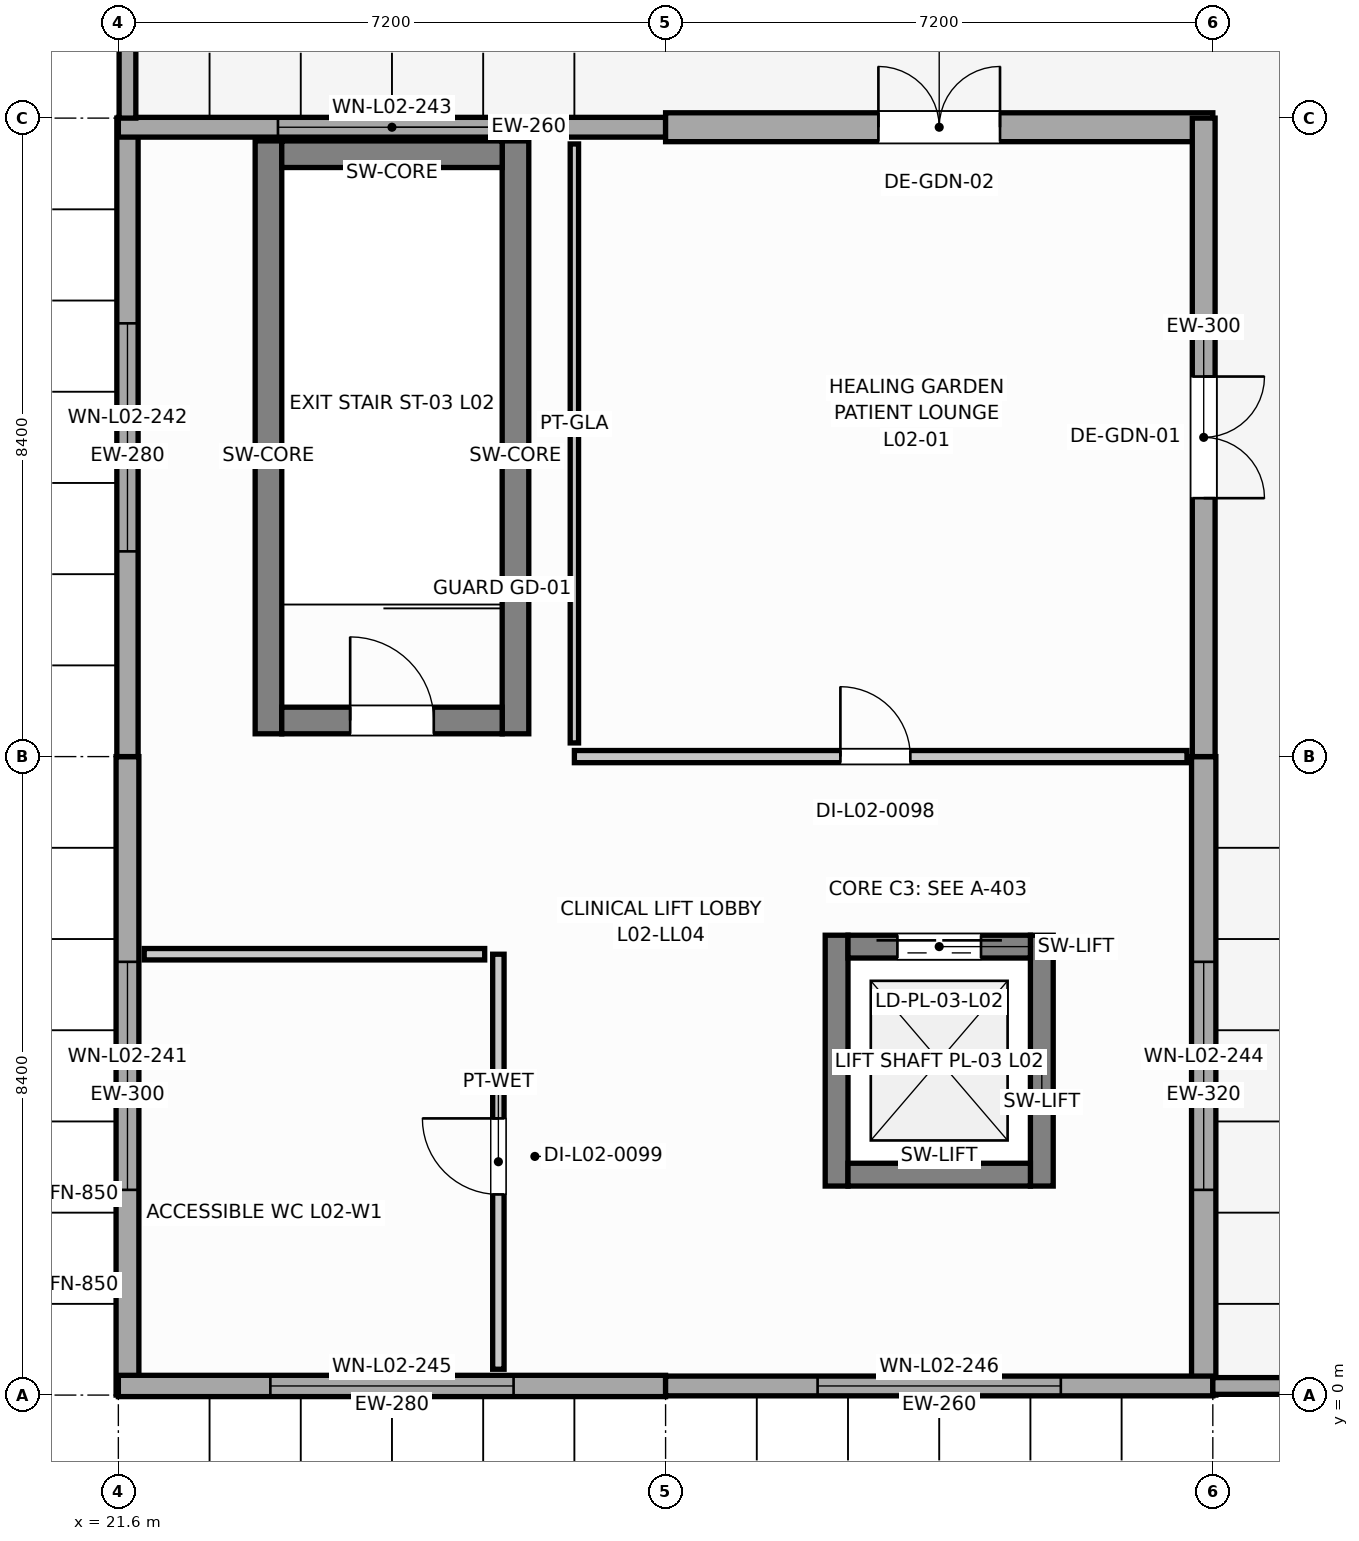
"""IFC4 building model, lengths in metres.
Left out: names, types, materials, properties, quantities, classifications, styles, units other than length and angle.
Written with IfcOpenShell. Run it as: python <this file> out.ifc"""

import sys

from ifc_helpers import new_model, si_unit, direction, frame, frame_2d, origin, place, context, subcontext, project, spatial, rectangle, extrude, element, fill, save


model = new_model("IFC4")
c1 = context("Model", 3, precision=1e-05, world=origin(), true_north=direction((0.0, 1.0)))
c2 = subcontext(c1, "Body", "Model", "MODEL_VIEW")
j1 = project(units=[si_unit("LENGTHUNIT", "METRE"), si_unit("PLANEANGLEUNIT", "RADIAN")], contexts=[c1])
p1 = place(None, origin())
s1 = spatial("IfcSite", under=j1, at=p1, CompositionType="ELEMENT")
p2 = place(p1, origin())
s2 = spatial("IfcBuilding", under=s1, at=p2, CompositionType="ELEMENT")
p3 = place(p2, frame((0.0, 0.0, 9.0)))
s3 = spatial("IfcBuildingStorey", under=s2, at=p3, CompositionType="ELEMENT", Elevation=9.0)
for number, where, z_axis, x_axis in (
    (1, (23.575, 8.7, 0.0), (0.0, 0.0, 1.0), (0.0, 1.0, 0.0)),
    (2, (26.825, 8.7, 0.0), (0.0, 0.0, 1.0), (0.0, 1.0, 0.0)),
):
    element("IfcWall", number, at=place(p3, frame(where, z_axis=z_axis, x_axis=x_axis)), inside=s3, PredefinedType="SHEAR", context=c2, shape_type="SweptSolid", body=[
        extrude(rectangle(XDim=7.8, YDim=0.35, at=frame_2d((3.9, 0.0))), origin(), (0.0, 0.0, 1.0), 3.965),
    ])
p4 = place(p3, frame((23.75, 16.325, 0.0), z_axis=(0.0, 0.0, 1.0), x_axis=(1.0, 0.0, 0.0)))
e3 = element("IfcWall", 3, at=p4, inside=s3, PredefinedType="SHEAR", context=c2, shape_type="SweptSolid", body=[
    extrude(rectangle(XDim=2.9, YDim=0.35, at=frame_2d((1.45, 0.0))), origin(), (0.0, 0.0, 1.0), 3.965),
])
p5 = place(p3, frame((23.75, 8.875, 0.0), z_axis=(0.0, 0.0, 1.0), x_axis=(1.0, 0.0, 0.0)))
e4 = element("IfcWall", 4, at=p5, inside=s3, PredefinedType="SHEAR", context=c2, shape_type="SweptSolid", body=[
    extrude(rectangle(XDim=2.9, YDim=0.35, at=frame_2d((1.45, 0.0))), origin(), (0.0, 0.0, 1.0), 3.965),
])
p6 = place(p5, frame((0.9, 0.0, 0.0)))
e5 = element("IfcOpeningElement", 5, at=p6, cuts=e4, PredefinedType="OPENING", context=c2, shape_type="SweptSolid", body=[
    extrude(rectangle(XDim=1.1, YDim=2.15, at=frame_2d((0.55, 1.075))), frame((0.0, 0.185, 0.0), z_axis=(0.0, -1.0, 0.0), x_axis=(1.0, 0.0, 0.0)), (0.0, 0.0, 1.0), 0.37),
])
for number, where, z_axis, x_axis in (
    (6, (31.05, 2.75, 0.0), (0.0, 0.0, 1.0), (0.0, 1.0, 0.0)),
    (7, (33.75, 2.75, 0.0), (0.0, 0.0, 1.0), (0.0, 1.0, 0.0)),
):
    element("IfcWall", number, at=place(p3, frame(where, z_axis=z_axis, x_axis=x_axis)), inside=s3, PredefinedType="SHEAR", context=c2, shape_type="SweptSolid", body=[
        extrude(rectangle(XDim=3.3, YDim=0.3, at=frame_2d((1.65, 0.0))), origin(), (0.0, 0.0, 1.0), 3.965),
    ])
p7 = place(p3, frame((31.2, 5.9, 0.0), z_axis=(0.0, 0.0, 1.0), x_axis=(1.0, 0.0, 0.0)))
e8 = element("IfcWall", 8, at=p7, inside=s3, PredefinedType="SHEAR", context=c2, shape_type="SweptSolid", body=[
    extrude(rectangle(XDim=2.4, YDim=0.3, at=frame_2d((1.2, 0.0))), origin(), (0.0, 0.0, 1.0), 3.965),
])
p8 = place(p7, frame((0.65, 0.0, 0.0)))
e9 = element("IfcOpeningElement", 9, at=p8, cuts=e8, PredefinedType="OPENING", context=c2, shape_type="SweptSolid", body=[
    extrude(rectangle(XDim=1.1, YDim=2.15, at=frame_2d((0.55, 1.075))), frame((0.0, 0.16, 0.0), z_axis=(0.0, -1.0, 0.0), x_axis=(1.0, 0.0, 0.0)), (0.0, 0.0, 1.0), 0.32),
])
p9 = place(p3, frame((31.2, 2.9, 0.0), z_axis=(0.0, 0.0, 1.0), x_axis=(1.0, 0.0, 0.0)))
e10 = element("IfcWall", 10, at=p9, inside=s3, PredefinedType="SHEAR", context=c2, shape_type="SweptSolid", body=[
    extrude(rectangle(XDim=2.4, YDim=0.3, at=frame_2d((1.2, 0.0))), origin(), (0.0, 0.0, 1.0), 3.965),
])
p10 = place(p3, frame((21.72, 0.0, 0.0), z_axis=(0.0, 0.0, 1.0), x_axis=(0.0, 1.0, 0.0)))
e11 = element("IfcWall", 11, at=p10, inside=s3, PredefinedType="SOLIDWALL", context=c2, shape_type="SweptSolid", body=[
    extrude(rectangle(XDim=8.4, YDim=0.3, at=frame_2d((4.2, 0.0))), origin(), (0.0, 0.0, 1.0), 3.94),
])
p11 = place(p10, frame((2.7, 0.0, 0.95)))
e12 = element("IfcOpeningElement", 12, at=p11, cuts=e11, PredefinedType="OPENING", context=c2, shape_type="SweptSolid", body=[
    extrude(rectangle(XDim=3.0, YDim=1.15, at=frame_2d((1.5, 0.575))), frame((0.0, 0.16, 0.0), z_axis=(0.0, -1.0, 0.0), x_axis=(1.0, 0.0, 0.0)), (0.0, 0.0, 1.0), 0.32),
])
p12 = place(p3, frame((21.72, 8.4, 0.0), z_axis=(0.0, 0.0, 1.0), x_axis=(0.0, 1.0, 0.0)))
e13 = element("IfcWall", 13, at=p12, inside=s3, PredefinedType="SOLIDWALL", context=c2, shape_type="SweptSolid", body=[
    extrude(rectangle(XDim=8.4, YDim=0.28, at=frame_2d((4.2, 0.0))), origin(), (0.0, 0.0, 1.0), 3.94),
])
p13 = place(p12, frame((2.7, 0.0, 0.95)))
e14 = element("IfcOpeningElement", 14, at=p13, cuts=e13, PredefinedType="OPENING", context=c2, shape_type="SweptSolid", body=[
    extrude(rectangle(XDim=3.0, YDim=1.35, at=frame_2d((1.5, 0.675))), frame((0.0, 0.15, 0.0), z_axis=(0.0, -1.0, 0.0), x_axis=(1.0, 0.0, 0.0)), (0.0, 0.0, 1.0), 0.3),
])
p14 = place(p3, frame((21.6, 16.68, 0.0), z_axis=(0.0, 0.0, 1.0), x_axis=(1.0, 0.0, 0.0)))
e15 = element("IfcWall", 15, at=p14, inside=s3, PredefinedType="SOLIDWALL", context=c2, shape_type="SweptSolid", body=[
    extrude(rectangle(XDim=7.2, YDim=0.26, at=frame_2d((3.6, 0.0))), origin(), (0.0, 0.0, 1.0), 3.94),
])
p15 = place(p14, frame((2.1, 0.0, 0.95)))
e16 = element("IfcOpeningElement", 16, at=p15, cuts=e15, PredefinedType="OPENING", context=c2, shape_type="SweptSolid", body=[
    extrude(rectangle(XDim=3.0, YDim=1.55, at=frame_2d((1.5, 0.775))), frame((0.0, 0.14, 0.0), z_axis=(0.0, -1.0, 0.0), x_axis=(1.0, 0.0, 0.0)), (0.0, 0.0, 1.0), 0.28),
])
p16 = place(p3, frame((28.8, 16.68, 0.0), z_axis=(0.0, 0.0, 1.0), x_axis=(1.0, 0.0, 0.0)))
e17 = element("IfcWall", 17, at=p16, inside=s3, PredefinedType="SOLIDWALL", context=c2, shape_type="SweptSolid", body=[
    extrude(rectangle(XDim=7.2, YDim=0.38, at=frame_2d((3.6, 0.0))), origin(), (0.0, 0.0, 1.0), 3.94),
])
p17 = place(p16, frame((2.8, 0.0, 0.0)))
e18 = element("IfcOpeningElement", 18, at=p17, cuts=e17, PredefinedType="OPENING", context=c2, shape_type="SweptSolid", body=[
    extrude(rectangle(XDim=1.6, YDim=2.2, at=frame_2d((0.8, 1.1))), frame((0.0, 0.2, 0.0), z_axis=(0.0, -1.0, 0.0), x_axis=(1.0, 0.0, 0.0)), (0.0, 0.0, 1.0), 0.4),
])
p18 = place(p3, frame((35.88, 0.0, 0.0), z_axis=(0.0, 0.0, 1.0), x_axis=(0.0, 1.0, 0.0)))
e19 = element("IfcWall", 19, at=p18, inside=s3, PredefinedType="SOLIDWALL", context=c2, shape_type="SweptSolid", body=[
    extrude(rectangle(XDim=8.4, YDim=0.32, at=frame_2d((4.2, 0.0))), origin(), (0.0, 0.0, 1.0), 3.94),
])
p19 = place(p18, frame((2.7, 0.0, 0.95)))
e20 = element("IfcOpeningElement", 20, at=p19, cuts=e19, PredefinedType="OPENING", context=c2, shape_type="SweptSolid", body=[
    extrude(rectangle(XDim=3.0, YDim=1.75, at=frame_2d((1.5, 0.875))), frame((0.0, 0.17, 0.0), z_axis=(0.0, -1.0, 0.0), x_axis=(1.0, 0.0, 0.0)), (0.0, 0.0, 1.0), 0.34),
])
p20 = place(p3, frame((35.88, 8.4, 0.0), z_axis=(0.0, 0.0, 1.0), x_axis=(0.0, 1.0, 0.0)))
e21 = element("IfcWall", 21, at=p20, inside=s3, PredefinedType="SOLIDWALL", context=c2, shape_type="SweptSolid", body=[
    extrude(rectangle(XDim=8.4, YDim=0.3, at=frame_2d((4.2, 0.0))), origin(), (0.0, 0.0, 1.0), 3.94),
])
p21 = place(p20, frame((3.4, 0.0, 0.0)))
e22 = element("IfcOpeningElement", 22, at=p21, cuts=e21, PredefinedType="OPENING", context=c2, shape_type="SweptSolid", body=[
    extrude(rectangle(XDim=1.6, YDim=2.2, at=frame_2d((0.8, 1.1))), frame((0.0, 0.16, 0.0), z_axis=(0.0, -1.0, 0.0), x_axis=(1.0, 0.0, 0.0)), (0.0, 0.0, 1.0), 0.32),
])
p22 = place(p3, frame((21.6, 0.12, 0.0), z_axis=(0.0, 0.0, 1.0), x_axis=(1.0, 0.0, 0.0)))
e23 = element("IfcWall", 23, at=p22, inside=s3, PredefinedType="SOLIDWALL", context=c2, shape_type="SweptSolid", body=[
    extrude(rectangle(XDim=7.2, YDim=0.28, at=frame_2d((3.6, 0.0))), origin(), (0.0, 0.0, 1.0), 3.94),
])
p23 = place(p22, frame((2.0, 0.0, 0.95)))
e24 = element("IfcOpeningElement", 24, at=p23, cuts=e23, PredefinedType="OPENING", context=c2, shape_type="SweptSolid", body=[
    extrude(rectangle(XDim=3.2, YDim=1.15, at=frame_2d((1.6, 0.575))), frame((0.0, 0.15, 0.0), z_axis=(0.0, -1.0, 0.0), x_axis=(1.0, 0.0, 0.0)), (0.0, 0.0, 1.0), 0.3),
])
p24 = place(p3, frame((28.8, 0.12, 0.0), z_axis=(0.0, 0.0, 1.0), x_axis=(1.0, 0.0, 0.0)))
e25 = element("IfcWall", 25, at=p24, inside=s3, PredefinedType="SOLIDWALL", context=c2, shape_type="SweptSolid", body=[
    extrude(rectangle(XDim=7.2, YDim=0.26, at=frame_2d((3.6, 0.0))), origin(), (0.0, 0.0, 1.0), 3.94),
])
p25 = place(p24, frame((2.0, 0.0, 0.95)))
e26 = element("IfcOpeningElement", 26, at=p25, cuts=e25, PredefinedType="OPENING", context=c2, shape_type="SweptSolid", body=[
    extrude(rectangle(XDim=3.2, YDim=1.35, at=frame_2d((1.6, 0.675))), frame((0.0, 0.14, 0.0), z_axis=(0.0, -1.0, 0.0), x_axis=(1.0, 0.0, 0.0)), (0.0, 0.0, 1.0), 0.28),
])
p26 = place(p3, frame((36.0, 0.12, 0.0), z_axis=(0.0, 0.0, 1.0), x_axis=(1.0, 0.0, 0.0)))
e27 = element("IfcWall", 27, at=p26, inside=s3, PredefinedType="PARAPET", context=c2, shape_type="SweptSolid", body=[
    extrude(rectangle(XDim=7.08, YDim=0.22, at=frame_2d((3.54, 0.0))), origin(), (0.0, 0.0, 1.0), 1.15),
])
p27 = place(p3, frame((21.72, 33.48, 0.0), z_axis=(0.0, 0.0, 1.0), x_axis=(0.0, -1.0, 0.0)))
e28 = element("IfcWall", 28, at=p27, inside=s3, PredefinedType="PARAPET", context=c2, shape_type="SweptSolid", body=[
    extrude(rectangle(XDim=16.68, YDim=0.22, at=frame_2d((8.34, 0.0))), origin(), (0.0, 0.0, 1.0), 1.15),
])
p28 = place(p3, frame((35.66, 8.4, 0.0), z_axis=(0.0, 0.0, 1.0), x_axis=(-1.0, 0.0, 0.0)))
e29 = element("IfcWall", 29, at=p28, inside=s3, PredefinedType="PARTITIONING", context=c2, shape_type="SweptSolid", body=[
    extrude(rectangle(XDim=8.06, YDim=0.16, at=frame_2d((4.03, 0.0))), origin(), (0.0, 0.0, 1.0), 3.945),
])
p29 = place(p28, frame((3.64, 0.0, 0.0)))
e30 = element("IfcOpeningElement", 30, at=p29, cuts=e29, PredefinedType="OPENING", context=c2, shape_type="SweptSolid", body=[
    extrude(rectangle(XDim=0.92, YDim=2.1, at=frame_2d((0.46, 1.05))), frame((0.0, 0.09, 0.0), z_axis=(0.0, -1.0, 0.0), x_axis=(1.0, 0.0, 0.0)), (0.0, 0.0, 1.0), 0.18),
])
p30 = place(p3, frame((27.6, 8.58, 0.0), z_axis=(0.0, 0.0, 1.0), x_axis=(0.0, 1.0, 0.0)))
e31 = element("IfcWall", 31, at=p30, inside=s3, PredefinedType="MOVABLE", context=c2, shape_type="SweptSolid", body=[
    extrude(rectangle(XDim=7.88, YDim=0.11, at=frame_2d((3.94, 0.0))), origin(), (0.0, 0.0, 1.0), 3.945),
])
p31 = place(p3, frame((26.6, 5.8, 0.0), z_axis=(0.0, 0.0, 1.0), x_axis=(0.0, -1.0, 0.0)))
e32 = element("IfcWall", 32, at=p31, inside=s3, PredefinedType="PLUMBINGWALL", context=c2, shape_type="SweptSolid", body=[
    extrude(rectangle(XDim=5.46, YDim=0.15, at=frame_2d((2.73, 0.0))), origin(), (0.0, 0.0, 1.0), 3.945),
])
p32 = place(p31, frame((2.16, 0.0, 0.0)))
e33 = element("IfcOpeningElement", 33, at=p32, cuts=e32, PredefinedType="OPENING", context=c2, shape_type="SweptSolid", body=[
    extrude(rectangle(XDim=1.0, YDim=2.1, at=frame_2d((0.5, 1.05))), frame((0.0, 0.085, 0.0), z_axis=(0.0, -1.0, 0.0), x_axis=(1.0, 0.0, 0.0)), (0.0, 0.0, 1.0), 0.17),
])
p33 = place(p3, frame((21.94, 5.8, 0.0), z_axis=(0.0, 0.0, 1.0), x_axis=(1.0, 0.0, 0.0)))
e34 = element("IfcWall", 34, at=p33, inside=s3, PredefinedType="PLUMBINGWALL", context=c2, shape_type="SweptSolid", body=[
    extrude(rectangle(XDim=4.48, YDim=0.15, at=frame_2d((2.24, 0.0))), origin(), (0.0, 0.0, 1.0), 3.945),
])
p34 = place(p6, origin())
e35 = element("IfcDoor", 35, at=p34, inside=s3, OperationType="SINGLE_SWING_LEFT", PredefinedType="DOOR", context=c2, shape_type="SweptSolid", body=[
    extrude(rectangle(XDim=1.1, YDim=2.15, at=frame_2d((0.55, 1.075))), frame((0.0, 0.025, 0.0), z_axis=(0.0, -1.0, 0.0), x_axis=(1.0, 0.0, 0.0)), (0.0, 0.0, 1.0), 0.05),
])
fill(e5, e35)
p35 = place(p8, origin())
e36 = element("IfcDoor", 36, at=p35, inside=s3, OperationType="DOUBLE_DOOR_SLIDING", PredefinedType="DOOR", context=c2, shape_type="SweptSolid", body=[
    extrude(rectangle(XDim=1.1, YDim=2.15, at=frame_2d((0.55, 1.075))), frame((0.0, 0.025, 0.0), z_axis=(0.0, -1.0, 0.0), x_axis=(1.0, 0.0, 0.0)), (0.0, 0.0, 1.0), 0.05),
])
fill(e9, e36)
p36 = place(p11, origin())
e37 = element("IfcWindow", 37, at=p36, inside=s3, PartitioningType="SINGLE_PANEL", PredefinedType="WINDOW", context=c2, shape_type="SweptSolid", body=[
    extrude(rectangle(XDim=3.0, YDim=1.15, at=frame_2d((1.5, 0.575))), frame((0.0, 0.03, 0.0), z_axis=(0.0, -1.0, 0.0), x_axis=(1.0, 0.0, 0.0)), (0.0, 0.0, 1.0), 0.06),
])
fill(e12, e37)
p37 = place(p13, origin())
e38 = element("IfcWindow", 38, at=p37, inside=s3, PartitioningType="SINGLE_PANEL", PredefinedType="WINDOW", context=c2, shape_type="SweptSolid", body=[
    extrude(rectangle(XDim=3.0, YDim=1.35, at=frame_2d((1.5, 0.675))), frame((0.0, 0.03, 0.0), z_axis=(0.0, -1.0, 0.0), x_axis=(1.0, 0.0, 0.0)), (0.0, 0.0, 1.0), 0.06),
])
fill(e14, e38)
p38 = place(p15, origin())
e39 = element("IfcWindow", 39, at=p38, inside=s3, PartitioningType="SINGLE_PANEL", PredefinedType="WINDOW", context=c2, shape_type="SweptSolid", body=[
    extrude(rectangle(XDim=3.0, YDim=1.55, at=frame_2d((1.5, 0.775))), frame((0.0, 0.03, 0.0), z_axis=(0.0, -1.0, 0.0), x_axis=(1.0, 0.0, 0.0)), (0.0, 0.0, 1.0), 0.06),
])
fill(e16, e39)
p39 = place(p17, origin())
e40 = element("IfcDoor", 40, at=p39, inside=s3, OperationType="DOUBLE_DOOR_SINGLE_SWING", PredefinedType="DOOR", context=c2, shape_type="SweptSolid", body=[
    extrude(rectangle(XDim=1.6, YDim=2.2, at=frame_2d((0.8, 1.1))), frame((0.0, 0.025, 0.0), z_axis=(0.0, -1.0, 0.0), x_axis=(1.0, 0.0, 0.0)), (0.0, 0.0, 1.0), 0.05),
])
fill(e18, e40)
p40 = place(p19, origin())
e41 = element("IfcWindow", 41, at=p40, inside=s3, PartitioningType="SINGLE_PANEL", PredefinedType="WINDOW", context=c2, shape_type="SweptSolid", body=[
    extrude(rectangle(XDim=3.0, YDim=1.75, at=frame_2d((1.5, 0.875))), frame((0.0, 0.03, 0.0), z_axis=(0.0, -1.0, 0.0), x_axis=(1.0, 0.0, 0.0)), (0.0, 0.0, 1.0), 0.06),
])
fill(e20, e41)
p41 = place(p21, frame((1.6, 0.0, 0.0), z_axis=(0.0, 0.0, 1.0), x_axis=(-1.0, 0.0, 0.0)))
e42 = element("IfcDoor", 42, at=p41, inside=s3, OperationType="DOUBLE_DOOR_SINGLE_SWING", PredefinedType="DOOR", context=c2, shape_type="SweptSolid", body=[
    extrude(rectangle(XDim=1.6, YDim=2.2, at=frame_2d((0.8, 1.1))), frame((0.0, 0.025, 0.0), z_axis=(0.0, -1.0, 0.0), x_axis=(1.0, 0.0, 0.0)), (0.0, 0.0, 1.0), 0.05),
])
fill(e22, e42)
p42 = place(p23, origin())
e43 = element("IfcWindow", 43, at=p42, inside=s3, PartitioningType="SINGLE_PANEL", PredefinedType="WINDOW", context=c2, shape_type="SweptSolid", body=[
    extrude(rectangle(XDim=3.2, YDim=1.15, at=frame_2d((1.6, 0.575))), frame((0.0, 0.03, 0.0), z_axis=(0.0, -1.0, 0.0), x_axis=(1.0, 0.0, 0.0)), (0.0, 0.0, 1.0), 0.06),
])
fill(e24, e43)
p43 = place(p25, origin())
e44 = element("IfcWindow", 44, at=p43, inside=s3, PartitioningType="SINGLE_PANEL", PredefinedType="WINDOW", context=c2, shape_type="SweptSolid", body=[
    extrude(rectangle(XDim=3.2, YDim=1.35, at=frame_2d((1.6, 0.675))), frame((0.0, 0.03, 0.0), z_axis=(0.0, -1.0, 0.0), x_axis=(1.0, 0.0, 0.0)), (0.0, 0.0, 1.0), 0.06),
])
fill(e26, e44)
p44 = place(p29, frame((0.92, 0.0, 0.0), z_axis=(0.0, 0.0, 1.0), x_axis=(-1.0, 0.0, 0.0)))
e45 = element("IfcDoor", 45, at=p44, inside=s3, OperationType="SINGLE_SWING_LEFT", PredefinedType="DOOR", context=c2, shape_type="SweptSolid", body=[
    extrude(rectangle(XDim=0.92, YDim=2.1, at=frame_2d((0.46, 1.05))), frame((0.0, 0.025, 0.0), z_axis=(0.0, -1.0, 0.0), x_axis=(1.0, 0.0, 0.0)), (0.0, 0.0, 1.0), 0.05),
])
fill(e30, e45)
p45 = place(p32, frame((1.0, 0.0, 0.0), z_axis=(0.0, 0.0, 1.0), x_axis=(-1.0, 0.0, 0.0)))
e46 = element("IfcDoor", 46, at=p45, inside=s3, OperationType="SINGLE_SWING_RIGHT", PredefinedType="DOOR", context=c2, shape_type="SweptSolid", body=[
    extrude(rectangle(XDim=1.0, YDim=2.1, at=frame_2d((0.5, 1.05))), frame((0.0, 0.025, 0.0), z_axis=(0.0, -1.0, 0.0), x_axis=(1.0, 0.0, 0.0)), (0.0, 0.0, 1.0), 0.05),
])
fill(e33, e46)
save(model, sys.argv[1])
